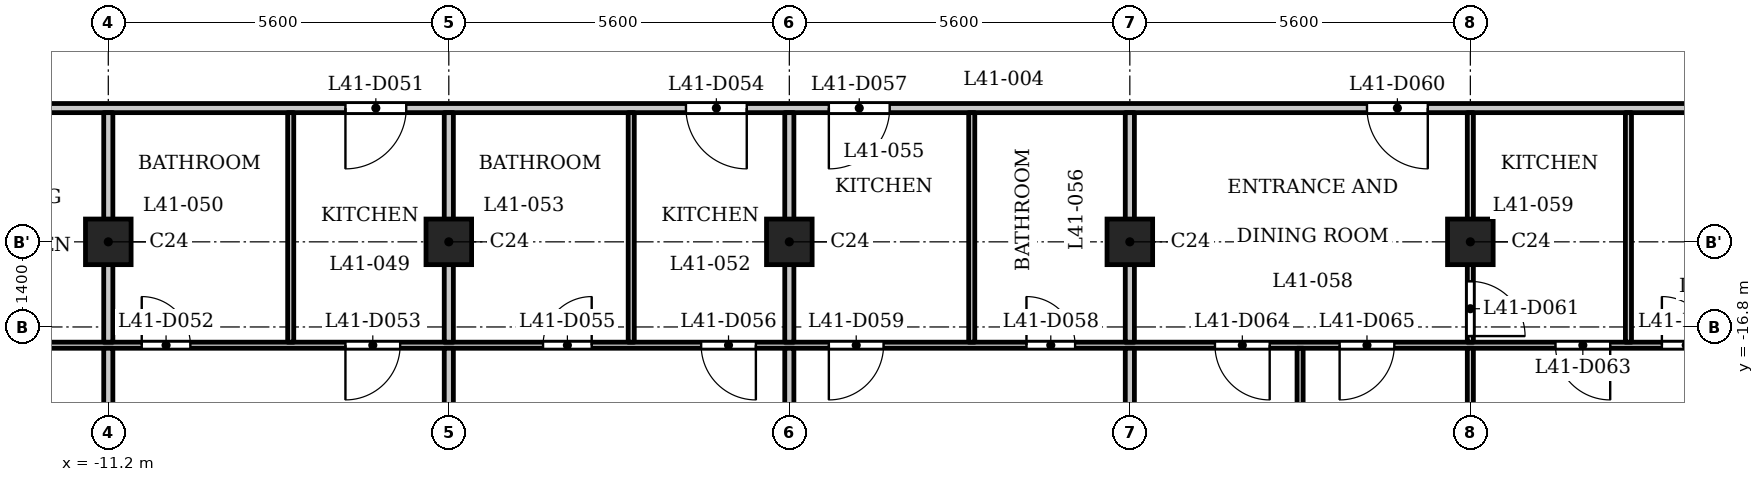
"""IFC4 building model, lengths in metres.
Left out: names, types, materials, properties, quantities, classifications, styles, units other than length and angle.
Written with IfcOpenShell. Run it as: python <this file> out.ifc"""

import sys

from ifc_helpers import new_model, si_unit, direction, frame, frame_2d, origin, origin_2d, place, context, subcontext, project, spatial, rectangle, extrude, element, fill, save


model = new_model("IFC4")
c1 = context("Model", 3, precision=1e-05, world=origin(), true_north=direction((0.0, 1.0)))
c2 = subcontext(c1, "Body", "Model", "MODEL_VIEW")
j1 = project(units=[si_unit("LENGTHUNIT", "METRE"), si_unit("PLANEANGLEUNIT", "RADIAN")], contexts=[c1])
p1 = place(None, origin())
s1 = spatial("IfcSite", under=j1, at=p1, CompositionType="ELEMENT")
p2 = place(p1, origin())
s2 = spatial("IfcBuilding", under=s1, at=p2, CompositionType="ELEMENT")
p3 = place(p2, frame((0.0, 0.0, 160.6)))
s3 = spatial("IfcBuildingStorey", under=s2, at=p3, CompositionType="ELEMENT", Elevation=160.6)
for number, where, z_axis, x_axis in (
    (1, (-11.2, -15.4, 0.0), (0.0, 0.0, 1.0), (1.0, 0.0, 0.0)),
    (2, (-5.6, -15.4, 0.0), (0.0, 0.0, 1.0), (1.0, 0.0, 0.0)),
    (3, (0.0, -15.4, 0.0), (0.0, 0.0, 1.0), (1.0, 0.0, 0.0)),
    (4, (5.6, -15.4, 0.0), (0.0, 0.0, 1.0), (1.0, 0.0, 0.0)),
    (5, (11.2, -15.4, 0.0), (0.0, 0.0, 1.0), (1.0, 0.0, 0.0)),
):
    element("IfcColumn", number, at=place(p3, frame(where, z_axis=z_axis, x_axis=x_axis)), inside=s3, PredefinedType="COLUMN", context=c2, shape_type="SweptSolid", body=[
        extrude(rectangle(XDim=0.75, YDim=0.75, at=origin_2d()), origin(), (0.0, 0.0, 1.0), 3.5),
    ])
p4 = place(p3, frame((-16.725, -17.1, 0.0), z_axis=(0.0, 0.0, 1.0), x_axis=(1.0, 0.0, 0.0)))
e6 = element("IfcWall", 6, at=p4, inside=s3, PredefinedType="PARTITIONING", context=c2, shape_type="SweptSolid", body=[
    extrude(rectangle(XDim=33.45, YDim=0.1, at=frame_2d((16.725, 0.0))), origin(), (0.0, 0.0, 1.0), 3.2),
])
p5 = place(p4, frame((0.725, 0.0, 0.0)))
e7 = element("IfcOpeningElement", 7, at=p5, cuts=e6, PredefinedType="OPENING", context=c2, shape_type="SweptSolid", body=[
    extrude(rectangle(XDim=0.8, YDim=2.1, at=frame_2d((0.4, 1.05))), frame((0.0, 0.06, 0.0), z_axis=(0.0, -1.0, 0.0), x_axis=(1.0, 0.0, 0.0)), (0.0, 0.0, 1.0), 0.12),
])
p6 = place(p4, frame((3.175, 0.0, 0.0)))
e8 = element("IfcOpeningElement", 8, at=p6, cuts=e6, PredefinedType="OPENING", context=c2, shape_type="SweptSolid", body=[
    extrude(rectangle(XDim=0.9, YDim=2.1, at=frame_2d((0.45, 1.05))), frame((0.0, 0.06, 0.0), z_axis=(0.0, -1.0, 0.0), x_axis=(1.0, 0.0, 0.0)), (0.0, 0.0, 1.0), 0.12),
])
p7 = place(p4, frame((6.075, 0.0, 0.0)))
e9 = element("IfcOpeningElement", 9, at=p7, cuts=e6, PredefinedType="OPENING", context=c2, shape_type="SweptSolid", body=[
    extrude(rectangle(XDim=0.8, YDim=2.1, at=frame_2d((0.4, 1.05))), frame((0.0, 0.06, 0.0), z_axis=(0.0, -1.0, 0.0), x_axis=(1.0, 0.0, 0.0)), (0.0, 0.0, 1.0), 0.12),
])
p8 = place(p4, frame((9.425, 0.0, 0.0)))
e10 = element("IfcOpeningElement", 10, at=p8, cuts=e6, PredefinedType="OPENING", context=c2, shape_type="SweptSolid", body=[
    extrude(rectangle(XDim=0.9, YDim=2.1, at=frame_2d((0.45, 1.05))), frame((0.0, 0.06, 0.0), z_axis=(0.0, -1.0, 0.0), x_axis=(1.0, 0.0, 0.0)), (0.0, 0.0, 1.0), 0.12),
])
p9 = place(p4, frame((12.675, 0.0, 0.0)))
e11 = element("IfcOpeningElement", 11, at=p9, cuts=e6, PredefinedType="OPENING", context=c2, shape_type="SweptSolid", body=[
    extrude(rectangle(XDim=0.8, YDim=2.1, at=frame_2d((0.4, 1.05))), frame((0.0, 0.06, 0.0), z_axis=(0.0, -1.0, 0.0), x_axis=(1.0, 0.0, 0.0)), (0.0, 0.0, 1.0), 0.12),
])
p10 = place(p4, frame((15.275, 0.0, 0.0)))
e12 = element("IfcOpeningElement", 12, at=p10, cuts=e6, PredefinedType="OPENING", context=c2, shape_type="SweptSolid", body=[
    extrude(rectangle(XDim=0.9, YDim=2.1, at=frame_2d((0.45, 1.05))), frame((0.0, 0.06, 0.0), z_axis=(0.0, -1.0, 0.0), x_axis=(1.0, 0.0, 0.0)), (0.0, 0.0, 1.0), 0.12),
])
p11 = place(p4, frame((20.625, 0.0, 0.0)))
e13 = element("IfcOpeningElement", 13, at=p11, cuts=e6, PredefinedType="OPENING", context=c2, shape_type="SweptSolid", body=[
    extrude(rectangle(XDim=0.8, YDim=2.1, at=frame_2d((0.4, 1.05))), frame((0.0, 0.06, 0.0), z_axis=(0.0, -1.0, 0.0), x_axis=(1.0, 0.0, 0.0)), (0.0, 0.0, 1.0), 0.12),
])
p12 = place(p4, frame((17.375, 0.0, 0.0)))
e14 = element("IfcOpeningElement", 14, at=p12, cuts=e6, PredefinedType="OPENING", context=c2, shape_type="SweptSolid", body=[
    extrude(rectangle(XDim=0.9, YDim=2.1, at=frame_2d((0.45, 1.05))), frame((0.0, 0.06, 0.0), z_axis=(0.0, -1.0, 0.0), x_axis=(1.0, 0.0, 0.0)), (0.0, 0.0, 1.0), 0.12),
])
p13 = place(p4, frame((31.075, 0.0, 0.0)))
e15 = element("IfcOpeningElement", 15, at=p13, cuts=e6, PredefinedType="OPENING", context=c2, shape_type="SweptSolid", body=[
    extrude(rectangle(XDim=0.8, YDim=2.1, at=frame_2d((0.4, 1.05))), frame((0.0, 0.06, 0.0), z_axis=(0.0, -1.0, 0.0), x_axis=(1.0, 0.0, 0.0)), (0.0, 0.0, 1.0), 0.12),
])
p14 = place(p4, frame((29.325, 0.0, 0.0)))
e16 = element("IfcOpeningElement", 16, at=p14, cuts=e6, PredefinedType="OPENING", context=c2, shape_type="SweptSolid", body=[
    extrude(rectangle(XDim=0.9, YDim=2.1, at=frame_2d((0.45, 1.05))), frame((0.0, 0.06, 0.0), z_axis=(0.0, -1.0, 0.0), x_axis=(1.0, 0.0, 0.0)), (0.0, 0.0, 1.0), 0.12),
])
p15 = place(p4, frame((23.725, 0.0, 0.0)))
e17 = element("IfcOpeningElement", 17, at=p15, cuts=e6, PredefinedType="OPENING", context=c2, shape_type="SweptSolid", body=[
    extrude(rectangle(XDim=0.9, YDim=2.1, at=frame_2d((0.45, 1.05))), frame((0.0, 0.06, 0.0), z_axis=(0.0, -1.0, 0.0), x_axis=(1.0, 0.0, 0.0)), (0.0, 0.0, 1.0), 0.12),
])
p16 = place(p4, frame((25.775, 0.0, 0.0)))
e18 = element("IfcOpeningElement", 18, at=p16, cuts=e6, PredefinedType="OPENING", context=c2, shape_type="SweptSolid", body=[
    extrude(rectangle(XDim=0.9, YDim=2.1, at=frame_2d((0.45, 1.05))), frame((0.0, 0.06, 0.0), z_axis=(0.0, -1.0, 0.0), x_axis=(1.0, 0.0, 0.0)), (0.0, 0.0, 1.0), 0.12),
])
p17 = place(p3, frame((-17.4, -13.2, 0.0), z_axis=(0.0, 0.0, 1.0), x_axis=(1.0, 0.0, 0.0)))
e19 = element("IfcWall", 19, at=p17, inside=s3, PredefinedType="PARTITIONING", context=c2, shape_type="SweptSolid", body=[
    extrude(rectangle(XDim=34.8, YDim=0.15, at=frame_2d((17.4, 0.0))), origin(), (0.0, 0.0, 1.0), 3.2),
])
p18 = place(p17, frame((0.15, 0.0, 0.0)))
e20 = element("IfcOpeningElement", 20, at=p18, cuts=e19, PredefinedType="OPENING", context=c2, shape_type="SweptSolid", body=[
    extrude(rectangle(XDim=1.0, YDim=2.1, at=frame_2d((0.5, 1.05))), frame((0.0, 0.085, 0.0), z_axis=(0.0, -1.0, 0.0), x_axis=(1.0, 0.0, 0.0)), (0.0, 0.0, 1.0), 0.17),
])
p19 = place(p17, frame((33.55, 0.0, 0.0)))
e21 = element("IfcOpeningElement", 21, at=p19, cuts=e19, PredefinedType="OPENING", context=c2, shape_type="SweptSolid", body=[
    extrude(rectangle(XDim=1.0, YDim=2.1, at=frame_2d((0.5, 1.05))), frame((0.0, 0.085, 0.0), z_axis=(0.0, -1.0, 0.0), x_axis=(1.0, 0.0, 0.0)), (0.0, 0.0, 1.0), 0.17),
])
p20 = place(p17, frame((3.5, 0.0, 0.0)))
e22 = element("IfcOpeningElement", 22, at=p20, cuts=e19, PredefinedType="OPENING", context=c2, shape_type="SweptSolid", body=[
    extrude(rectangle(XDim=1.0, YDim=2.1, at=frame_2d((0.5, 1.05))), frame((0.0, 0.085, 0.0), z_axis=(0.0, -1.0, 0.0), x_axis=(1.0, 0.0, 0.0)), (0.0, 0.0, 1.0), 0.17),
])
p21 = place(p17, frame((10.1, 0.0, 0.0)))
e23 = element("IfcOpeningElement", 23, at=p21, cuts=e19, PredefinedType="OPENING", context=c2, shape_type="SweptSolid", body=[
    extrude(rectangle(XDim=1.0, YDim=2.1, at=frame_2d((0.5, 1.05))), frame((0.0, 0.085, 0.0), z_axis=(0.0, -1.0, 0.0), x_axis=(1.0, 0.0, 0.0)), (0.0, 0.0, 1.0), 0.17),
])
p22 = place(p17, frame((15.7, 0.0, 0.0)))
e24 = element("IfcOpeningElement", 24, at=p22, cuts=e19, PredefinedType="OPENING", context=c2, shape_type="SweptSolid", body=[
    extrude(rectangle(XDim=1.0, YDim=2.1, at=frame_2d((0.5, 1.05))), frame((0.0, 0.085, 0.0), z_axis=(0.0, -1.0, 0.0), x_axis=(1.0, 0.0, 0.0)), (0.0, 0.0, 1.0), 0.17),
])
p23 = place(p17, frame((18.05, 0.0, 0.0)))
e25 = element("IfcOpeningElement", 25, at=p23, cuts=e19, PredefinedType="OPENING", context=c2, shape_type="SweptSolid", body=[
    extrude(rectangle(XDim=1.0, YDim=2.1, at=frame_2d((0.5, 1.05))), frame((0.0, 0.085, 0.0), z_axis=(0.0, -1.0, 0.0), x_axis=(1.0, 0.0, 0.0)), (0.0, 0.0, 1.0), 0.17),
])
p24 = place(p17, frame((26.9, 0.0, 0.0)))
e26 = element("IfcOpeningElement", 26, at=p24, cuts=e19, PredefinedType="OPENING", context=c2, shape_type="SweptSolid", body=[
    extrude(rectangle(XDim=1.0, YDim=2.1, at=frame_2d((0.5, 1.05))), frame((0.0, 0.085, 0.0), z_axis=(0.0, -1.0, 0.0), x_axis=(1.0, 0.0, 0.0)), (0.0, 0.0, 1.0), 0.17),
])
p25 = place(p3, frame((-11.2, -22.88, 0.0), z_axis=(0.0, 0.0, 1.0), x_axis=(0.0, 1.0, 0.0)))
e27 = element("IfcWall", 27, at=p25, inside=s3, PredefinedType="PARTITIONING", context=c2, shape_type="SweptSolid", body=[
    extrude(rectangle(XDim=5.73, YDim=0.15, at=frame_2d((2.865, 0.0))), origin(), (0.0, 0.0, 1.0), 3.2),
])
p26 = place(p3, frame((-11.2, -17.05, 0.0), z_axis=(0.0, 0.0, 1.0), x_axis=(0.0, 1.0, 0.0)))
e28 = element("IfcWall", 28, at=p26, inside=s3, PredefinedType="PARTITIONING", context=c2, shape_type="SweptSolid", body=[
    extrude(rectangle(XDim=3.775, YDim=0.15, at=frame_2d((1.888, 0.0))), origin(), (0.0, 0.0, 1.0), 3.2),
])
p27 = place(p3, frame((-8.2, -17.05, 0.0), z_axis=(0.0, 0.0, 1.0), x_axis=(0.0, 1.0, 0.0)))
e29 = element("IfcWall", 29, at=p27, inside=s3, PredefinedType="PARTITIONING", context=c2, shape_type="SweptSolid", body=[
    extrude(rectangle(XDim=3.775, YDim=0.1, at=frame_2d((1.888, 0.0))), origin(), (0.0, 0.0, 1.0), 3.2),
])
p28 = place(p3, frame((-5.6, -22.88, 0.0), z_axis=(0.0, 0.0, 1.0), x_axis=(0.0, 1.0, 0.0)))
e30 = element("IfcWall", 30, at=p28, inside=s3, PredefinedType="PARTITIONING", context=c2, shape_type="SweptSolid", body=[
    extrude(rectangle(XDim=5.73, YDim=0.15, at=frame_2d((2.865, 0.0))), origin(), (0.0, 0.0, 1.0), 3.2),
])
p29 = place(p3, frame((-5.6, -17.05, 0.0), z_axis=(0.0, 0.0, 1.0), x_axis=(0.0, 1.0, 0.0)))
e31 = element("IfcWall", 31, at=p29, inside=s3, PredefinedType="PARTITIONING", context=c2, shape_type="SweptSolid", body=[
    extrude(rectangle(XDim=3.775, YDim=0.15, at=frame_2d((1.888, 0.0))), origin(), (0.0, 0.0, 1.0), 3.2),
])
p30 = place(p3, frame((-2.6, -17.05, 0.0), z_axis=(0.0, 0.0, 1.0), x_axis=(0.0, 1.0, 0.0)))
e32 = element("IfcWall", 32, at=p30, inside=s3, PredefinedType="PARTITIONING", context=c2, shape_type="SweptSolid", body=[
    extrude(rectangle(XDim=3.775, YDim=0.1, at=frame_2d((1.888, 0.0))), origin(), (0.0, 0.0, 1.0), 3.2),
])
p31 = place(p3, frame((0.0, -22.88, 0.0), z_axis=(0.0, 0.0, 1.0), x_axis=(0.0, 1.0, 0.0)))
e33 = element("IfcWall", 33, at=p31, inside=s3, PredefinedType="PARTITIONING", context=c2, shape_type="SweptSolid", body=[
    extrude(rectangle(XDim=5.73, YDim=0.15, at=frame_2d((2.865, 0.0))), origin(), (0.0, 0.0, 1.0), 3.2),
])
p32 = place(p3, frame((0.0, -17.05, 0.0), z_axis=(0.0, 0.0, 1.0), x_axis=(0.0, 1.0, 0.0)))
e34 = element("IfcWall", 34, at=p32, inside=s3, PredefinedType="PARTITIONING", context=c2, shape_type="SweptSolid", body=[
    extrude(rectangle(XDim=3.775, YDim=0.15, at=frame_2d((1.888, 0.0))), origin(), (0.0, 0.0, 1.0), 3.2),
])
p33 = place(p3, frame((3.0, -17.05, 0.0), z_axis=(0.0, 0.0, 1.0), x_axis=(0.0, 1.0, 0.0)))
e35 = element("IfcWall", 35, at=p33, inside=s3, PredefinedType="PARTITIONING", context=c2, shape_type="SweptSolid", body=[
    extrude(rectangle(XDim=3.775, YDim=0.1, at=frame_2d((1.888, 0.0))), origin(), (0.0, 0.0, 1.0), 3.2),
])
p34 = place(p3, frame((5.6, -22.88, 0.0), z_axis=(0.0, 0.0, 1.0), x_axis=(0.0, 1.0, 0.0)))
e36 = element("IfcWall", 36, at=p34, inside=s3, PredefinedType="PARTITIONING", context=c2, shape_type="SweptSolid", body=[
    extrude(rectangle(XDim=5.73, YDim=0.15, at=frame_2d((2.865, 0.0))), origin(), (0.0, 0.0, 1.0), 3.2),
])
p35 = place(p3, frame((5.6, -17.05, 0.0), z_axis=(0.0, 0.0, 1.0), x_axis=(0.0, 1.0, 0.0)))
e37 = element("IfcWall", 37, at=p35, inside=s3, PredefinedType="PARTITIONING", context=c2, shape_type="SweptSolid", body=[
    extrude(rectangle(XDim=3.775, YDim=0.15, at=frame_2d((1.888, 0.0))), origin(), (0.0, 0.0, 1.0), 3.2),
])
p36 = place(p3, frame((8.4, -22.08, 0.0), z_axis=(0.0, 0.0, 1.0), x_axis=(0.0, 1.0, 0.0)))
e38 = element("IfcWall", 38, at=p36, inside=s3, PredefinedType="PARTITIONING", context=c2, shape_type="SweptSolid", body=[
    extrude(rectangle(XDim=4.93, YDim=0.1, at=frame_2d((2.465, 0.0))), origin(), (0.0, 0.0, 1.0), 3.2),
])
p37 = place(p3, frame((11.2, -22.88, 0.0), z_axis=(0.0, 0.0, 1.0), x_axis=(0.0, 1.0, 0.0)))
e39 = element("IfcWall", 39, at=p37, inside=s3, PredefinedType="PARTITIONING", context=c2, shape_type="SweptSolid", body=[
    extrude(rectangle(XDim=5.73, YDim=0.1, at=frame_2d((2.865, 0.0))), origin(), (0.0, 0.0, 1.0), 3.2),
])
p38 = place(p3, frame((11.2, -17.05, 0.0), z_axis=(0.0, 0.0, 1.0), x_axis=(0.0, 1.0, 0.0)))
e40 = element("IfcWall", 40, at=p38, inside=s3, PredefinedType="PARTITIONING", context=c2, shape_type="SweptSolid", body=[
    extrude(rectangle(XDim=3.775, YDim=0.1, at=frame_2d((1.888, 0.0))), origin(), (0.0, 0.0, 1.0), 3.2),
])
p39 = place(p38, frame((0.1, 0.0, 0.0)))
e41 = element("IfcOpeningElement", 41, at=p39, cuts=e40, PredefinedType="OPENING", context=c2, shape_type="SweptSolid", body=[
    extrude(rectangle(XDim=0.9, YDim=2.1, at=frame_2d((0.45, 1.05))), frame((0.0, 0.06, 0.0), z_axis=(0.0, -1.0, 0.0), x_axis=(1.0, 0.0, 0.0)), (0.0, 0.0, 1.0), 0.12),
])
p40 = place(p3, frame((13.8, -17.05, 0.0), z_axis=(0.0, 0.0, 1.0), x_axis=(0.0, 1.0, 0.0)))
e42 = element("IfcWall", 42, at=p40, inside=s3, PredefinedType="PARTITIONING", context=c2, shape_type="SweptSolid", body=[
    extrude(rectangle(XDim=3.775, YDim=0.1, at=frame_2d((1.888, 0.0))), origin(), (0.0, 0.0, 1.0), 3.2),
])
p41 = place(p21, origin())
e43 = element("IfcDoor", 43, at=p41, inside=s3, OperationType="SINGLE_SWING_LEFT", PredefinedType="DOOR", context=c2, shape_type="SweptSolid", body=[
    extrude(rectangle(XDim=1.0, YDim=2.1, at=frame_2d((0.5, 1.05))), frame((0.0, 0.025, 0.0), z_axis=(0.0, -1.0, 0.0), x_axis=(1.0, 0.0, 0.0)), (0.0, 0.0, 1.0), 0.05),
])
fill(e23, e43)
p42 = place(p7, origin())
e44 = element("IfcDoor", 44, at=p42, inside=s3, OperationType="SINGLE_SWING_RIGHT", PredefinedType="DOOR", context=c2, shape_type="SweptSolid", body=[
    extrude(rectangle(XDim=0.8, YDim=2.1, at=frame_2d((0.4, 1.05))), frame((0.0, 0.025, 0.0), z_axis=(0.0, -1.0, 0.0), x_axis=(1.0, 0.0, 0.0)), (0.0, 0.0, 1.0), 0.05),
])
fill(e9, e44)
p43 = place(p8, origin())
e45 = element("IfcDoor", 45, at=p43, inside=s3, OperationType="SINGLE_SWING_LEFT", PredefinedType="DOOR", context=c2, shape_type="SweptSolid", body=[
    extrude(rectangle(XDim=0.9, YDim=2.1, at=frame_2d((0.45, 1.05))), frame((0.0, 0.025, 0.0), z_axis=(0.0, -1.0, 0.0), x_axis=(1.0, 0.0, 0.0)), (0.0, 0.0, 1.0), 0.05),
])
fill(e10, e45)
p44 = place(p22, origin())
e46 = element("IfcDoor", 46, at=p44, inside=s3, OperationType="SINGLE_SWING_RIGHT", PredefinedType="DOOR", context=c2, shape_type="SweptSolid", body=[
    extrude(rectangle(XDim=1.0, YDim=2.1, at=frame_2d((0.5, 1.05))), frame((0.0, 0.025, 0.0), z_axis=(0.0, -1.0, 0.0), x_axis=(1.0, 0.0, 0.0)), (0.0, 0.0, 1.0), 0.05),
])
fill(e24, e46)
p45 = place(p9, origin())
e47 = element("IfcDoor", 47, at=p45, inside=s3, OperationType="SINGLE_SWING_LEFT", PredefinedType="DOOR", context=c2, shape_type="SweptSolid", body=[
    extrude(rectangle(XDim=0.8, YDim=2.1, at=frame_2d((0.4, 1.05))), frame((0.0, 0.025, 0.0), z_axis=(0.0, -1.0, 0.0), x_axis=(1.0, 0.0, 0.0)), (0.0, 0.0, 1.0), 0.05),
])
fill(e11, e47)
p46 = place(p10, origin())
e48 = element("IfcDoor", 48, at=p46, inside=s3, OperationType="SINGLE_SWING_RIGHT", PredefinedType="DOOR", context=c2, shape_type="SweptSolid", body=[
    extrude(rectangle(XDim=0.9, YDim=2.1, at=frame_2d((0.45, 1.05))), frame((0.0, 0.025, 0.0), z_axis=(0.0, -1.0, 0.0), x_axis=(1.0, 0.0, 0.0)), (0.0, 0.0, 1.0), 0.05),
])
fill(e12, e48)
p47 = place(p23, origin())
e49 = element("IfcDoor", 49, at=p47, inside=s3, OperationType="SINGLE_SWING_LEFT", PredefinedType="DOOR", context=c2, shape_type="SweptSolid", body=[
    extrude(rectangle(XDim=1.0, YDim=2.1, at=frame_2d((0.5, 1.05))), frame((0.0, 0.025, 0.0), z_axis=(0.0, -1.0, 0.0), x_axis=(1.0, 0.0, 0.0)), (0.0, 0.0, 1.0), 0.05),
])
fill(e25, e49)
p48 = place(p11, origin())
e50 = element("IfcDoor", 50, at=p48, inside=s3, OperationType="SINGLE_SWING_RIGHT", PredefinedType="DOOR", context=c2, shape_type="SweptSolid", body=[
    extrude(rectangle(XDim=0.8, YDim=2.1, at=frame_2d((0.4, 1.05))), frame((0.0, 0.025, 0.0), z_axis=(0.0, -1.0, 0.0), x_axis=(1.0, 0.0, 0.0)), (0.0, 0.0, 1.0), 0.05),
])
fill(e13, e50)
p49 = place(p12, origin())
e51 = element("IfcDoor", 51, at=p49, inside=s3, OperationType="SINGLE_SWING_LEFT", PredefinedType="DOOR", context=c2, shape_type="SweptSolid", body=[
    extrude(rectangle(XDim=0.9, YDim=2.1, at=frame_2d((0.45, 1.05))), frame((0.0, 0.025, 0.0), z_axis=(0.0, -1.0, 0.0), x_axis=(1.0, 0.0, 0.0)), (0.0, 0.0, 1.0), 0.05),
])
fill(e14, e51)
p50 = place(p24, origin())
e52 = element("IfcDoor", 52, at=p50, inside=s3, OperationType="SINGLE_SWING_RIGHT", PredefinedType="DOOR", context=c2, shape_type="SweptSolid", body=[
    extrude(rectangle(XDim=1.0, YDim=2.1, at=frame_2d((0.5, 1.05))), frame((0.0, 0.025, 0.0), z_axis=(0.0, -1.0, 0.0), x_axis=(1.0, 0.0, 0.0)), (0.0, 0.0, 1.0), 0.05),
])
fill(e26, e52)
p51 = place(p39, origin())
e53 = element("IfcDoor", 53, at=p51, inside=s3, OperationType="SINGLE_SWING_LEFT", PredefinedType="DOOR", context=c2, shape_type="SweptSolid", body=[
    extrude(rectangle(XDim=0.9, YDim=2.1, at=frame_2d((0.45, 1.05))), frame((0.0, 0.025, 0.0), z_axis=(0.0, -1.0, 0.0), x_axis=(1.0, 0.0, 0.0)), (0.0, 0.0, 1.0), 0.05),
])
fill(e41, e53)
p52 = place(p13, origin())
e54 = element("IfcDoor", 54, at=p52, inside=s3, OperationType="SINGLE_SWING_RIGHT", PredefinedType="DOOR", context=c2, shape_type="SweptSolid", body=[
    extrude(rectangle(XDim=0.8, YDim=2.1, at=frame_2d((0.4, 1.05))), frame((0.0, 0.025, 0.0), z_axis=(0.0, -1.0, 0.0), x_axis=(1.0, 0.0, 0.0)), (0.0, 0.0, 1.0), 0.05),
])
fill(e15, e54)
p53 = place(p14, origin())
e55 = element("IfcDoor", 55, at=p53, inside=s3, OperationType="SINGLE_SWING_RIGHT", PredefinedType="DOOR", context=c2, shape_type="SweptSolid", body=[
    extrude(rectangle(XDim=0.9, YDim=2.1, at=frame_2d((0.45, 1.05))), frame((0.0, 0.025, 0.0), z_axis=(0.0, -1.0, 0.0), x_axis=(1.0, 0.0, 0.0)), (0.0, 0.0, 1.0), 0.05),
])
fill(e16, e55)
p54 = place(p15, origin())
e56 = element("IfcDoor", 56, at=p54, inside=s3, OperationType="SINGLE_SWING_RIGHT", PredefinedType="DOOR", context=c2, shape_type="SweptSolid", body=[
    extrude(rectangle(XDim=0.9, YDim=2.1, at=frame_2d((0.45, 1.05))), frame((0.0, 0.025, 0.0), z_axis=(0.0, -1.0, 0.0), x_axis=(1.0, 0.0, 0.0)), (0.0, 0.0, 1.0), 0.05),
])
fill(e17, e56)
p55 = place(p16, origin())
e57 = element("IfcDoor", 57, at=p55, inside=s3, OperationType="SINGLE_SWING_LEFT", PredefinedType="DOOR", context=c2, shape_type="SweptSolid", body=[
    extrude(rectangle(XDim=0.9, YDim=2.1, at=frame_2d((0.45, 1.05))), frame((0.0, 0.025, 0.0), z_axis=(0.0, -1.0, 0.0), x_axis=(1.0, 0.0, 0.0)), (0.0, 0.0, 1.0), 0.05),
])
fill(e18, e57)
save(model, sys.argv[1])
